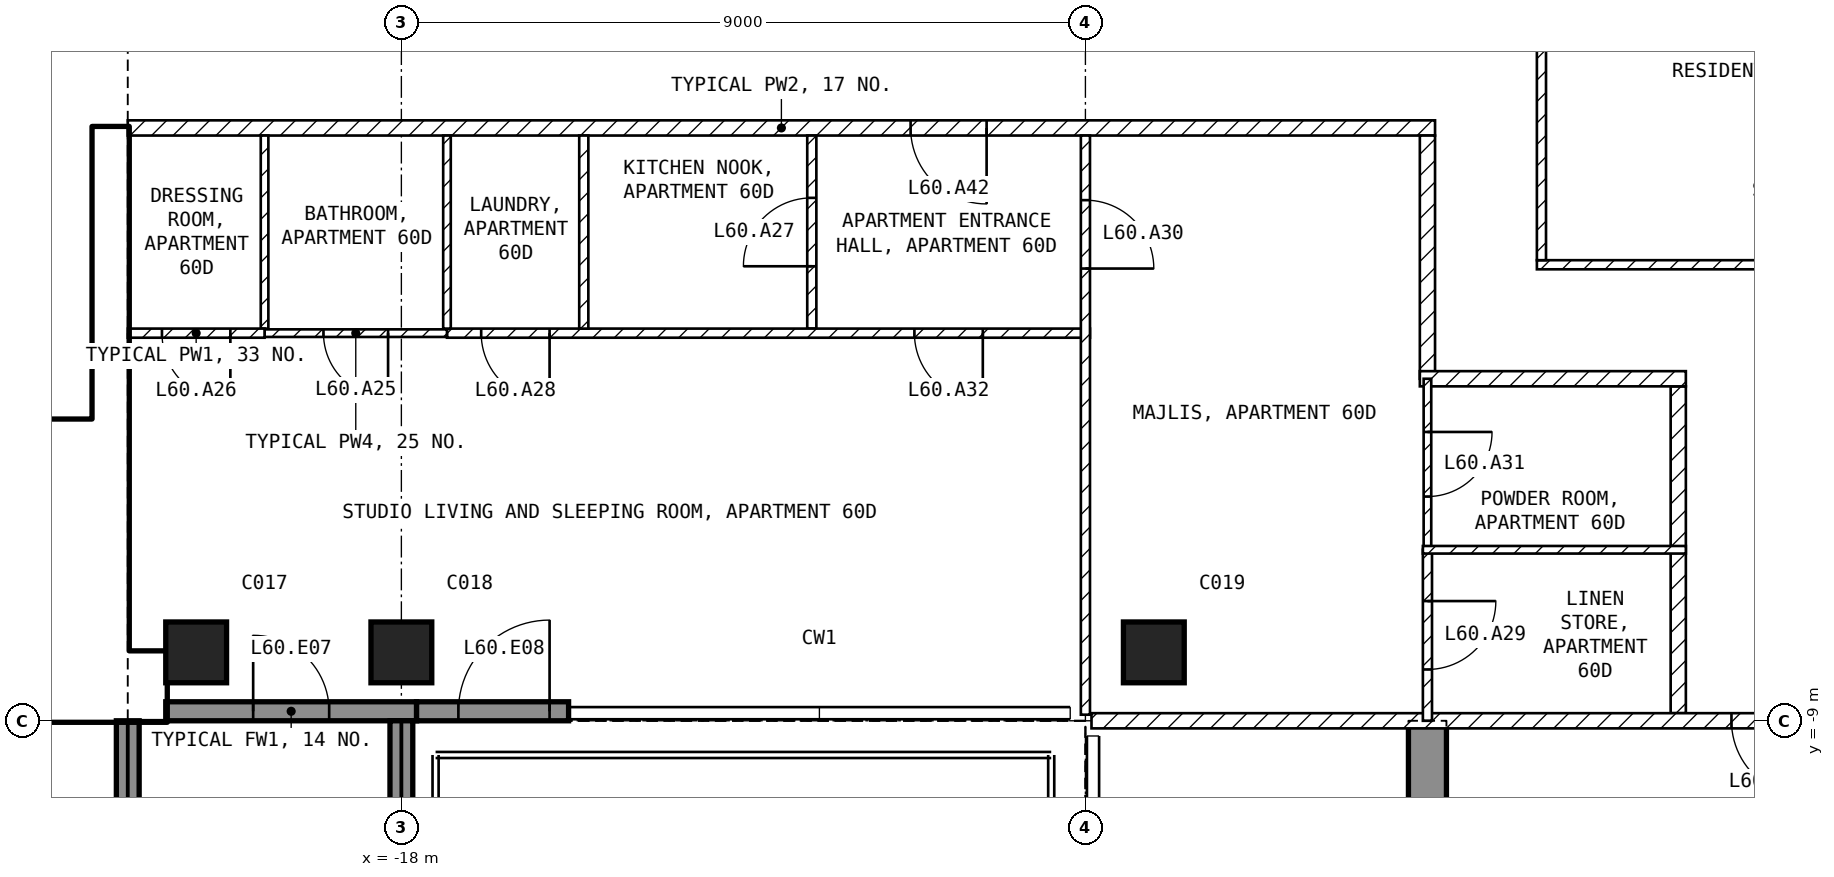
"""IFC4 building model, lengths in metres.
Left out: names, types, materials, properties, quantities, classifications, styles, units other than length and angle.
Written with IfcOpenShell. Run it as: python <this file> out.ifc"""

import sys

from ifc_helpers import new_model, si_unit, direction, frame, frame_2d, origin, origin_2d, place, context, subcontext, project, spatial, polyline, rectangle, outline, extrude, element, fill, save


model = new_model("IFC4")
c1 = context("Model", 3, precision=1e-05, world=origin(), true_north=direction((0.0, 1.0)))
c2 = subcontext(c1, "Body", "Model", "MODEL_VIEW")
j1 = project(units=[si_unit("LENGTHUNIT", "METRE"), si_unit("PLANEANGLEUNIT", "RADIAN")], contexts=[c1])
p1 = place(None, origin())
s1 = spatial("IfcSite", under=j1, at=p1, CompositionType="ELEMENT")
p2 = place(p1, origin())
s2 = spatial("IfcBuilding", under=s1, at=p2, CompositionType="ELEMENT")
p3 = place(p2, frame((0.0, 0.0, 239.5)))
s3 = spatial("IfcBuildingStorey", under=s2, at=p3, CompositionType="ELEMENT", Elevation=239.5)
for number, where, z_axis, x_axis in (
    (1, (-20.7, -8.1, -0.25), (0.0, 0.0, 1.0), (1.0, 0.0, 0.0)),
    (2, (-18.0, -8.1, -0.25), (0.0, 0.0, 1.0), (1.0, 0.0, 0.0)),
    (3, (-8.1, -8.1, -0.25), (0.0, 0.0, 1.0), (1.0, 0.0, 0.0)),
):
    element("IfcColumn", number, at=place(p3, frame(where, z_axis=z_axis, x_axis=x_axis)), inside=s3, PredefinedType="COLUMN", context=c2, shape_type="SweptSolid", body=[
        extrude(rectangle(XDim=0.8, YDim=0.8, at=origin_2d()), origin(), (0.0, 0.0, 1.0), 3.5),
    ])
p4 = place(p3, frame((-4.75, -16.7, -0.25), z_axis=(1.0, 0.0, 0.0), x_axis=(0.0, 1.0, 0.0)))
e4 = element("IfcWall", 4, at=p4, inside=s3, PredefinedType="SHEAR", context=c2, shape_type="SweptSolid", body=[
    extrude(outline(polyline([(0.0, 0.0), (3.2, 0.0), (3.2, 2.65), (5.6, 2.65), (5.6, 0.0), (7.7, 0.0), (7.7, 3.5), (0.0, 3.5), (0.0, 0.0)])), origin(), (0.0, 0.0, 1.0), 0.5),
])
p5 = place(p3, frame((-21.1, -8.875, 0.0), z_axis=(0.0, 0.0, 1.0), x_axis=(1.0, 0.0, 0.0)))
e5 = element("IfcWall", 5, at=p5, inside=s3, PredefinedType="SOLIDWALL", context=c2, shape_type="SweptSolid", body=[
    extrude(rectangle(XDim=3.3, YDim=0.25, at=frame_2d((1.65, 0.0))), origin(), (0.0, 0.0, 1.0), 3.25),
])
p6 = place(p5, frame((1.15, 0.0, 0.0)))
e6 = element("IfcOpeningElement", 6, at=p6, cuts=e5, PredefinedType="OPENING", context=c2, shape_type="SweptSolid", body=[
    extrude(rectangle(XDim=1.0, YDim=2.4, at=frame_2d((0.5, 1.2))), frame((0.0, 0.135, 0.0), z_axis=(0.0, -1.0, 0.0), x_axis=(1.0, 0.0, 0.0)), (0.0, 0.0, 1.0), 0.27),
])
p7 = place(p3, frame((-17.8, -8.875, 0.0), z_axis=(0.0, 0.0, 1.0), x_axis=(1.0, 0.0, 0.0)))
e7 = element("IfcWall", 7, at=p7, inside=s3, PredefinedType="SOLIDWALL", context=c2, shape_type="SweptSolid", body=[
    extrude(rectangle(XDim=2.0, YDim=0.25, at=frame_2d((1.0, 0.0))), origin(), (0.0, 0.0, 1.0), 3.25),
])
p8 = place(p7, frame((0.55, 0.0, 0.0)))
e8 = element("IfcOpeningElement", 8, at=p8, cuts=e7, PredefinedType="OPENING", context=c2, shape_type="SweptSolid", body=[
    extrude(rectangle(XDim=1.2, YDim=2.4, at=frame_2d((0.6, 1.2))), frame((0.0, 0.135, 0.0), z_axis=(0.0, -1.0, 0.0), x_axis=(1.0, 0.0, 0.0)), (0.0, 0.0, 1.0), 0.27),
])
p9 = place(p3, frame((-21.6, -9.0, 0.0), z_axis=(0.0, 0.0, 1.0), x_axis=(0.0, -1.0, 0.0)))
e9 = element("IfcWall", 9, at=p9, inside=s3, PredefinedType="SOLIDWALL", context=c2, shape_type="SweptSolid", body=[
    extrude(rectangle(XDim=2.7, YDim=0.3, at=frame_2d((1.35, 0.0))), origin(), (0.0, 0.0, 1.0), 3.25),
])
p10 = place(p3, frame((-18.0, -9.0, 0.0), z_axis=(0.0, 0.0, 1.0), x_axis=(0.0, -1.0, 0.0)))
e10 = element("IfcWall", 10, at=p10, inside=s3, PredefinedType="SOLIDWALL", context=c2, shape_type="SweptSolid", body=[
    extrude(rectangle(XDim=2.74, YDim=0.3, at=frame_2d((1.37, 0.0))), origin(), (0.0, 0.0, 1.0), 3.25),
])
p11 = place(p3, frame((-30.2, -8.55, 0.0), z_axis=(0.0, 0.0, 1.0), x_axis=(1.0, 0.0, 0.0)))
e11 = element("IfcWall", 11, at=p11, inside=s3, PredefinedType="SHEAR", context=c2, shape_type="SweptSolid", body=[
    extrude(rectangle(XDim=9.1, YDim=0.9, at=frame_2d((4.55, 0.0))), origin(), (0.0, 0.0, 1.0), 3.25),
])
p12 = place(p3, frame((-21.825, -8.1, 0.0), z_axis=(0.0, 0.0, 1.0), x_axis=(0.0, 1.0, 0.0)))
e12 = element("IfcWall", 12, at=p12, inside=s3, PredefinedType="SHEAR", context=c2, shape_type="SweptSolid", body=[
    extrude(rectangle(XDim=6.9, YDim=0.45, at=frame_2d((3.45, 0.0))), origin(), (0.0, 0.0, 1.0), 3.25),
])
p13 = place(p3, frame((-28.35, -5.15, 0.0), z_axis=(0.0, 0.0, 1.0), x_axis=(1.0, 0.0, 0.0)))
e13 = element("IfcWall", 13, at=p13, inside=s3, PredefinedType="SOLIDWALL", context=c2, shape_type="SweptSolid", body=[
    extrude(rectangle(XDim=6.3, YDim=0.2, at=frame_2d((3.15, 0.0))), origin(), (0.0, 0.0, 1.0), 3.25),
])
p14 = place(p13, frame((5.1, 0.0, 0.0)))
e14 = element("IfcOpeningElement", 14, at=p14, cuts=e13, PredefinedType="OPENING", context=c2, shape_type="SweptSolid", body=[
    extrude(rectangle(XDim=1.0, YDim=2.1, at=frame_2d((0.5, 1.05))), frame((0.0, 0.11, 0.0), z_axis=(0.0, -1.0, 0.0), x_axis=(1.0, 0.0, 0.0)), (0.0, 0.0, 1.0), 0.22),
])
p15 = place(p3, frame((-3.06, -3.0, 0.0), z_axis=(0.0, 0.0, 1.0), x_axis=(1.0, 0.0, 0.0)))
e15 = element("IfcWall", 15, at=p15, inside=s3, PredefinedType="PARTITIONING", context=c2, shape_type="SweptSolid", body=[
    extrude(rectangle(XDim=6.12, YDim=0.12, at=frame_2d((3.06, 0.0))), origin(), (0.0, 0.0, 1.0), 3.25),
])
p16 = place(p3, frame((-3.0, 2.94, 0.0), z_axis=(0.0, 0.0, 1.0), x_axis=(0.0, -1.0, 0.0)))
e16 = element("IfcWall", 16, at=p16, inside=s3, PredefinedType="PARTITIONING", context=c2, shape_type="SweptSolid", body=[
    extrude(rectangle(XDim=5.88, YDim=0.12, at=frame_2d((2.94, 0.0))), origin(), (0.0, 0.0, 1.0), 3.25),
])
p17 = place(p3, frame((-4.4, -1.2, 0.0), z_axis=(0.0, 0.0, 1.0), x_axis=(-1.0, 0.0, 0.0)))
e17 = element("IfcWall", 17, at=p17, inside=s3, PredefinedType="PARTITIONING", context=c2, shape_type="SweptSolid", body=[
    extrude(rectangle(XDim=17.2, YDim=0.2, at=frame_2d((8.6, 0.0))), origin(), (0.0, 0.0, 1.0), 3.25),
])
p18 = place(p17, frame((5.9, 0.0, 0.0)))
e18 = element("IfcOpeningElement", 18, at=p18, cuts=e17, PredefinedType="OPENING", context=c2, shape_type="SweptSolid", body=[
    extrude(rectangle(XDim=1.0, YDim=2.1, at=frame_2d((0.5, 1.05))), frame((0.0, 0.11, 0.0), z_axis=(0.0, -1.0, 0.0), x_axis=(1.0, 0.0, 0.0)), (0.0, 0.0, 1.0), 0.22),
])
p19 = place(p3, frame((-4.5, -4.5, 0.0), z_axis=(0.0, 0.0, 1.0), x_axis=(0.0, 1.0, 0.0)))
e19 = element("IfcWall", 19, at=p19, inside=s3, PredefinedType="PARTITIONING", context=c2, shape_type="SweptSolid", body=[
    extrude(rectangle(XDim=3.2, YDim=0.2, at=frame_2d((1.6, 0.0))), origin(), (0.0, 0.0, 1.0), 3.25),
])
p20 = place(p3, frame((-1.2, -8.9, 0.0), z_axis=(0.0, 0.0, 1.0), x_axis=(0.0, 1.0, 0.0)))
e20 = element("IfcWall", 20, at=p20, inside=s3, PredefinedType="PARTITIONING", context=c2, shape_type="SweptSolid", body=[
    extrude(rectangle(XDim=4.3, YDim=0.2, at=frame_2d((2.15, 0.0))), origin(), (0.0, 0.0, 1.0), 3.25),
])
p21 = place(p3, frame((-1.1, -4.5, 0.0), z_axis=(0.0, 0.0, 1.0), x_axis=(-1.0, 0.0, 0.0)))
e21 = element("IfcWall", 21, at=p21, inside=s3, PredefinedType="PARTITIONING", context=c2, shape_type="SweptSolid", body=[
    extrude(rectangle(XDim=3.5, YDim=0.2, at=frame_2d((1.75, 0.0))), origin(), (0.0, 0.0, 1.0), 3.25),
])
p22 = place(p3, frame((8.92, -9.0, 0.0), z_axis=(0.0, 0.0, 1.0), x_axis=(-1.0, 0.0, 0.0)))
e22 = element("IfcWall", 22, at=p22, inside=s3, PredefinedType="PARTITIONING", context=c2, shape_type="SweptSolid", body=[
    extrude(rectangle(XDim=17.84, YDim=0.2, at=frame_2d((8.92, 0.0))), origin(), (0.0, 0.0, 1.0), 3.25),
])
p23 = place(p22, frame((8.42, 0.0, 0.0)))
e23 = element("IfcOpeningElement", 23, at=p23, cuts=e22, PredefinedType="OPENING", context=c2, shape_type="SweptSolid", body=[
    extrude(rectangle(XDim=1.0, YDim=2.1, at=frame_2d((0.5, 1.05))), frame((0.0, 0.11, 0.0), z_axis=(0.0, -1.0, 0.0), x_axis=(1.0, 0.0, 0.0)), (0.0, 0.0, 1.0), 0.22),
])
p24 = place(p3, frame((-12.6, -3.84, 0.0), z_axis=(0.0, 0.0, 1.0), x_axis=(0.0, 1.0, 0.0)))
e24 = element("IfcWall", 24, at=p24, inside=s3, PredefinedType="PARTITIONING", context=c2, shape_type="SweptSolid", body=[
    extrude(rectangle(XDim=2.54, YDim=0.12, at=frame_2d((1.27, 0.0))), origin(), (0.0, 0.0, 1.0), 3.25),
])
p25 = place(p24, frame((0.82, 0.0, 0.0)))
e25 = element("IfcOpeningElement", 25, at=p25, cuts=e24, PredefinedType="OPENING", context=c2, shape_type="SweptSolid", body=[
    extrude(rectangle(XDim=0.9, YDim=2.1, at=frame_2d((0.45, 1.05))), frame((0.0, 0.07, 0.0), z_axis=(0.0, -1.0, 0.0), x_axis=(1.0, 0.0, 0.0)), (0.0, 0.0, 1.0), 0.14),
])
p26 = place(p3, frame((-8.94, -3.9, 0.0), z_axis=(0.0, 0.0, 1.0), x_axis=(-1.0, 0.0, 0.0)))
e26 = element("IfcWall", 26, at=p26, inside=s3, PredefinedType="PARTITIONING", context=c2, shape_type="SweptSolid", body=[
    extrude(rectangle(XDim=8.46, YDim=0.12, at=frame_2d((4.23, 0.0))), origin(), (0.0, 0.0, 1.0), 3.25),
])
p27 = place(p26, frame((7.11, 0.0, 0.0)))
e27 = element("IfcOpeningElement", 27, at=p27, cuts=e26, PredefinedType="OPENING", context=c2, shape_type="SweptSolid", body=[
    extrude(rectangle(XDim=0.9, YDim=2.1, at=frame_2d((0.45, 1.05))), frame((0.0, 0.07, 0.0), z_axis=(0.0, -1.0, 0.0), x_axis=(1.0, 0.0, 0.0)), (0.0, 0.0, 1.0), 0.14),
])
p28 = place(p26, frame((1.41, 0.0, 0.0)))
e28 = element("IfcOpeningElement", 28, at=p28, cuts=e26, PredefinedType="OPENING", context=c2, shape_type="SweptSolid", body=[
    extrude(rectangle(XDim=0.9, YDim=2.1, at=frame_2d((0.45, 1.05))), frame((0.0, 0.07, 0.0), z_axis=(0.0, -1.0, 0.0), x_axis=(1.0, 0.0, 0.0)), (0.0, 0.0, 1.0), 0.14),
])
p29 = place(p3, frame((-9.0, -1.3, 0.0), z_axis=(0.0, 0.0, 1.0), x_axis=(0.0, -1.0, 0.0)))
e29 = element("IfcWall", 29, at=p29, inside=s3, PredefinedType="PARTITIONING", context=c2, shape_type="SweptSolid", body=[
    extrude(rectangle(XDim=7.62, YDim=0.12, at=frame_2d((3.81, 0.0))), origin(), (0.0, 0.0, 1.0), 3.25),
])
p30 = place(p29, frame((0.85, 0.0, 0.0)))
e30 = element("IfcOpeningElement", 30, at=p30, cuts=e29, PredefinedType="OPENING", context=c2, shape_type="SweptSolid", body=[
    extrude(rectangle(XDim=0.9, YDim=2.1, at=frame_2d((0.45, 1.05))), frame((0.0, 0.07, 0.0), z_axis=(0.0, -1.0, 0.0), x_axis=(1.0, 0.0, 0.0)), (0.0, 0.0, 1.0), 0.14),
])
p31 = place(p3, frame((-15.6, -3.84, 0.0), z_axis=(0.0, 0.0, 1.0), x_axis=(0.0, 1.0, 0.0)))
e31 = element("IfcWall", 31, at=p31, inside=s3, PredefinedType="PARTITIONING", context=c2, shape_type="SweptSolid", body=[
    extrude(rectangle(XDim=2.54, YDim=0.12, at=frame_2d((1.27, 0.0))), origin(), (0.0, 0.0, 1.0), 3.25),
])
for number, where, z_axis, x_axis in (
    (32, (-17.4, -3.84, 0.0), (0.0, 0.0, 1.0), (0.0, 1.0, 0.0)),
    (33, (-19.8, -3.84, 0.0), (0.0, 0.0, 1.0), (0.0, 1.0, 0.0)),
):
    element("IfcWall", number, at=place(p3, frame(where, z_axis=z_axis, x_axis=x_axis)), inside=s3, PredefinedType="PARTITIONING", context=c2, shape_type="SweptSolid", body=[
        extrude(rectangle(XDim=2.54, YDim=0.1, at=frame_2d((1.27, 0.0))), origin(), (0.0, 0.0, 1.0), 3.25),
    ])
p32 = place(p3, frame((-17.4, -3.9, 0.0), z_axis=(0.0, 0.0, 1.0), x_axis=(-1.0, 0.0, 0.0)))
e34 = element("IfcWall", 34, at=p32, inside=s3, PredefinedType="PARTITIONING", context=c2, shape_type="SweptSolid", body=[
    extrude(rectangle(XDim=2.4, YDim=0.1, at=frame_2d((1.2, 0.0))), origin(), (0.0, 0.0, 1.0), 3.25),
])
p33 = place(p32, frame((0.775, 0.0, 0.0)))
e35 = element("IfcOpeningElement", 35, at=p33, cuts=e34, PredefinedType="OPENING", context=c2, shape_type="SweptSolid", body=[
    extrude(rectangle(XDim=0.85, YDim=2.1, at=frame_2d((0.425, 1.05))), frame((0.0, 0.06, 0.0), z_axis=(0.0, -1.0, 0.0), x_axis=(1.0, 0.0, 0.0)), (0.0, 0.0, 1.0), 0.12),
])
p34 = place(p3, frame((-19.8, -3.9, 0.0), z_axis=(0.0, 0.0, 1.0), x_axis=(-1.0, 0.0, 0.0)))
e36 = element("IfcWall", 36, at=p34, inside=s3, PredefinedType="PARTITIONING", context=c2, shape_type="SweptSolid", body=[
    extrude(rectangle(XDim=1.8, YDim=0.12, at=frame_2d((0.9, 0.0))), origin(), (0.0, 0.0, 1.0), 3.25),
])
p35 = place(p34, frame((0.45, 0.0, 0.0)))
e37 = element("IfcOpeningElement", 37, at=p35, cuts=e36, PredefinedType="OPENING", context=c2, shape_type="SweptSolid", body=[
    extrude(rectangle(XDim=0.9, YDim=2.1, at=frame_2d((0.45, 1.05))), frame((0.0, 0.07, 0.0), z_axis=(0.0, -1.0, 0.0), x_axis=(1.0, 0.0, 0.0)), (0.0, 0.0, 1.0), 0.14),
])
p36 = place(p3, frame((-4.5, -4.5, 0.0), z_axis=(0.0, 0.0, 1.0), x_axis=(0.0, -1.0, 0.0)))
e38 = element("IfcWall", 38, at=p36, inside=s3, PredefinedType="PARTITIONING", context=c2, shape_type="SweptSolid", body=[
    extrude(rectangle(XDim=2.25, YDim=0.1, at=frame_2d((1.125, 0.0))), origin(), (0.0, 0.0, 1.0), 3.25),
])
p37 = place(p36, frame((0.7, 0.0, 0.0)))
e39 = element("IfcOpeningElement", 39, at=p37, cuts=e38, PredefinedType="OPENING", context=c2, shape_type="SweptSolid", body=[
    extrude(rectangle(XDim=0.85, YDim=2.1, at=frame_2d((0.425, 1.05))), frame((0.0, 0.06, 0.0), z_axis=(0.0, -1.0, 0.0), x_axis=(1.0, 0.0, 0.0)), (0.0, 0.0, 1.0), 0.12),
])
p38 = place(p3, frame((-4.5, -6.75, 0.0), z_axis=(0.0, 0.0, 1.0), x_axis=(0.0, -1.0, 0.0)))
e40 = element("IfcWall", 40, at=p38, inside=s3, PredefinedType="PARTITIONING", context=c2, shape_type="SweptSolid", body=[
    extrude(rectangle(XDim=2.25, YDim=0.12, at=frame_2d((1.125, 0.0))), origin(), (0.0, 0.0, 1.0), 3.25),
])
p39 = place(p38, frame((0.675, 0.0, 0.0)))
e41 = element("IfcOpeningElement", 41, at=p39, cuts=e40, PredefinedType="OPENING", context=c2, shape_type="SweptSolid", body=[
    extrude(rectangle(XDim=0.9, YDim=2.1, at=frame_2d((0.45, 1.05))), frame((0.0, 0.07, 0.0), z_axis=(0.0, -1.0, 0.0), x_axis=(1.0, 0.0, 0.0)), (0.0, 0.0, 1.0), 0.14),
])
p40 = place(p3, frame((-1.1, -6.75, 0.0), z_axis=(0.0, 0.0, 1.0), x_axis=(-1.0, 0.0, 0.0)))
e42 = element("IfcWall", 42, at=p40, inside=s3, PredefinedType="PARTITIONING", context=c2, shape_type="SweptSolid", body=[
    extrude(rectangle(XDim=3.46, YDim=0.1, at=frame_2d((1.73, 0.0))), origin(), (0.0, 0.0, 1.0), 3.25),
])
p41 = place(p6, origin())
e43 = element("IfcDoor", 43, at=p41, inside=s3, OperationType="SINGLE_SWING_LEFT", PredefinedType="DOOR", context=c2, shape_type="SweptSolid", body=[
    extrude(rectangle(XDim=1.0, YDim=2.4, at=frame_2d((0.5, 1.2))), frame((0.0, 0.025, 0.0), z_axis=(0.0, -1.0, 0.0), x_axis=(1.0, 0.0, 0.0)), (0.0, 0.0, 1.0), 0.05),
])
fill(e6, e43)
p42 = place(p8, origin())
e44 = element("IfcDoor", 44, at=p42, inside=s3, OperationType="SINGLE_SWING_RIGHT", PredefinedType="DOOR", context=c2, shape_type="SweptSolid", body=[
    extrude(rectangle(XDim=1.2, YDim=2.4, at=frame_2d((0.6, 1.2))), frame((0.0, 0.025, 0.0), z_axis=(0.0, -1.0, 0.0), x_axis=(1.0, 0.0, 0.0)), (0.0, 0.0, 1.0), 0.05),
])
fill(e8, e44)
p43 = place(p14, origin())
e45 = element("IfcDoor", 45, at=p43, inside=s3, OperationType="SINGLE_SWING_LEFT", PredefinedType="DOOR", context=c2, shape_type="SweptSolid", body=[
    extrude(rectangle(XDim=1.0, YDim=2.1, at=frame_2d((0.5, 1.05))), frame((0.0, 0.025, 0.0), z_axis=(0.0, -1.0, 0.0), x_axis=(1.0, 0.0, 0.0)), (0.0, 0.0, 1.0), 0.05),
])
fill(e14, e45)
p44 = place(p33, origin())
e46 = element("IfcDoor", 46, at=p44, inside=s3, OperationType="SINGLE_SWING_LEFT", PredefinedType="DOOR", context=c2, shape_type="SweptSolid", body=[
    extrude(rectangle(XDim=0.85, YDim=2.1, at=frame_2d((0.425, 1.05))), frame((0.0, 0.025, 0.0), z_axis=(0.0, -1.0, 0.0), x_axis=(1.0, 0.0, 0.0)), (0.0, 0.0, 1.0), 0.05),
])
fill(e35, e46)
p45 = place(p35, origin())
e47 = element("IfcDoor", 47, at=p45, inside=s3, OperationType="SINGLE_SWING_LEFT", PredefinedType="DOOR", context=c2, shape_type="SweptSolid", body=[
    extrude(rectangle(XDim=0.9, YDim=2.1, at=frame_2d((0.45, 1.05))), frame((0.0, 0.025, 0.0), z_axis=(0.0, -1.0, 0.0), x_axis=(1.0, 0.0, 0.0)), (0.0, 0.0, 1.0), 0.05),
])
fill(e37, e47)
p46 = place(p25, origin())
e48 = element("IfcDoor", 48, at=p46, inside=s3, OperationType="SINGLE_SWING_LEFT", PredefinedType="DOOR", context=c2, shape_type="SweptSolid", body=[
    extrude(rectangle(XDim=0.9, YDim=2.1, at=frame_2d((0.45, 1.05))), frame((0.0, 0.025, 0.0), z_axis=(0.0, -1.0, 0.0), x_axis=(1.0, 0.0, 0.0)), (0.0, 0.0, 1.0), 0.05),
])
fill(e25, e48)
p47 = place(p27, origin())
e49 = element("IfcDoor", 49, at=p47, inside=s3, OperationType="SINGLE_SWING_LEFT", PredefinedType="DOOR", context=c2, shape_type="SweptSolid", body=[
    extrude(rectangle(XDim=0.9, YDim=2.1, at=frame_2d((0.45, 1.05))), frame((0.0, 0.025, 0.0), z_axis=(0.0, -1.0, 0.0), x_axis=(1.0, 0.0, 0.0)), (0.0, 0.0, 1.0), 0.05),
])
fill(e27, e49)
p48 = place(p39, origin())
e50 = element("IfcDoor", 50, at=p48, inside=s3, OperationType="SINGLE_SWING_LEFT", PredefinedType="DOOR", context=c2, shape_type="SweptSolid", body=[
    extrude(rectangle(XDim=0.9, YDim=2.1, at=frame_2d((0.45, 1.05))), frame((0.0, 0.025, 0.0), z_axis=(0.0, -1.0, 0.0), x_axis=(1.0, 0.0, 0.0)), (0.0, 0.0, 1.0), 0.05),
])
fill(e41, e50)
p49 = place(p30, origin())
e51 = element("IfcDoor", 51, at=p49, inside=s3, OperationType="SINGLE_SWING_RIGHT", PredefinedType="DOOR", context=c2, shape_type="SweptSolid", body=[
    extrude(rectangle(XDim=0.9, YDim=2.1, at=frame_2d((0.45, 1.05))), frame((0.0, 0.025, 0.0), z_axis=(0.0, -1.0, 0.0), x_axis=(1.0, 0.0, 0.0)), (0.0, 0.0, 1.0), 0.05),
])
fill(e30, e51)
p50 = place(p37, origin())
e52 = element("IfcDoor", 52, at=p50, inside=s3, OperationType="SINGLE_SWING_LEFT", PredefinedType="DOOR", context=c2, shape_type="SweptSolid", body=[
    extrude(rectangle(XDim=0.85, YDim=2.1, at=frame_2d((0.425, 1.05))), frame((0.0, 0.025, 0.0), z_axis=(0.0, -1.0, 0.0), x_axis=(1.0, 0.0, 0.0)), (0.0, 0.0, 1.0), 0.05),
])
fill(e39, e52)
p51 = place(p28, origin())
e53 = element("IfcDoor", 53, at=p51, inside=s3, OperationType="SINGLE_SWING_LEFT", PredefinedType="DOOR", context=c2, shape_type="SweptSolid", body=[
    extrude(rectangle(XDim=0.9, YDim=2.1, at=frame_2d((0.45, 1.05))), frame((0.0, 0.025, 0.0), z_axis=(0.0, -1.0, 0.0), x_axis=(1.0, 0.0, 0.0)), (0.0, 0.0, 1.0), 0.05),
])
fill(e28, e53)
p52 = place(p23, origin())
e54 = element("IfcDoor", 54, at=p52, inside=s3, OperationType="SINGLE_SWING_LEFT", PredefinedType="DOOR", context=c2, shape_type="SweptSolid", body=[
    extrude(rectangle(XDim=1.0, YDim=2.1, at=frame_2d((0.5, 1.05))), frame((0.0, 0.025, 0.0), z_axis=(0.0, -1.0, 0.0), x_axis=(1.0, 0.0, 0.0)), (0.0, 0.0, 1.0), 0.05),
])
fill(e23, e54)
p53 = place(p18, origin())
e55 = element("IfcDoor", 55, at=p53, inside=s3, OperationType="SINGLE_SWING_LEFT", PredefinedType="DOOR", context=c2, shape_type="SweptSolid", body=[
    extrude(rectangle(XDim=1.0, YDim=2.1, at=frame_2d((0.5, 1.05))), frame((0.0, 0.025, 0.0), z_axis=(0.0, -1.0, 0.0), x_axis=(1.0, 0.0, 0.0)), (0.0, 0.0, 1.0), 0.05),
])
fill(e18, e55)
save(model, sys.argv[1])
